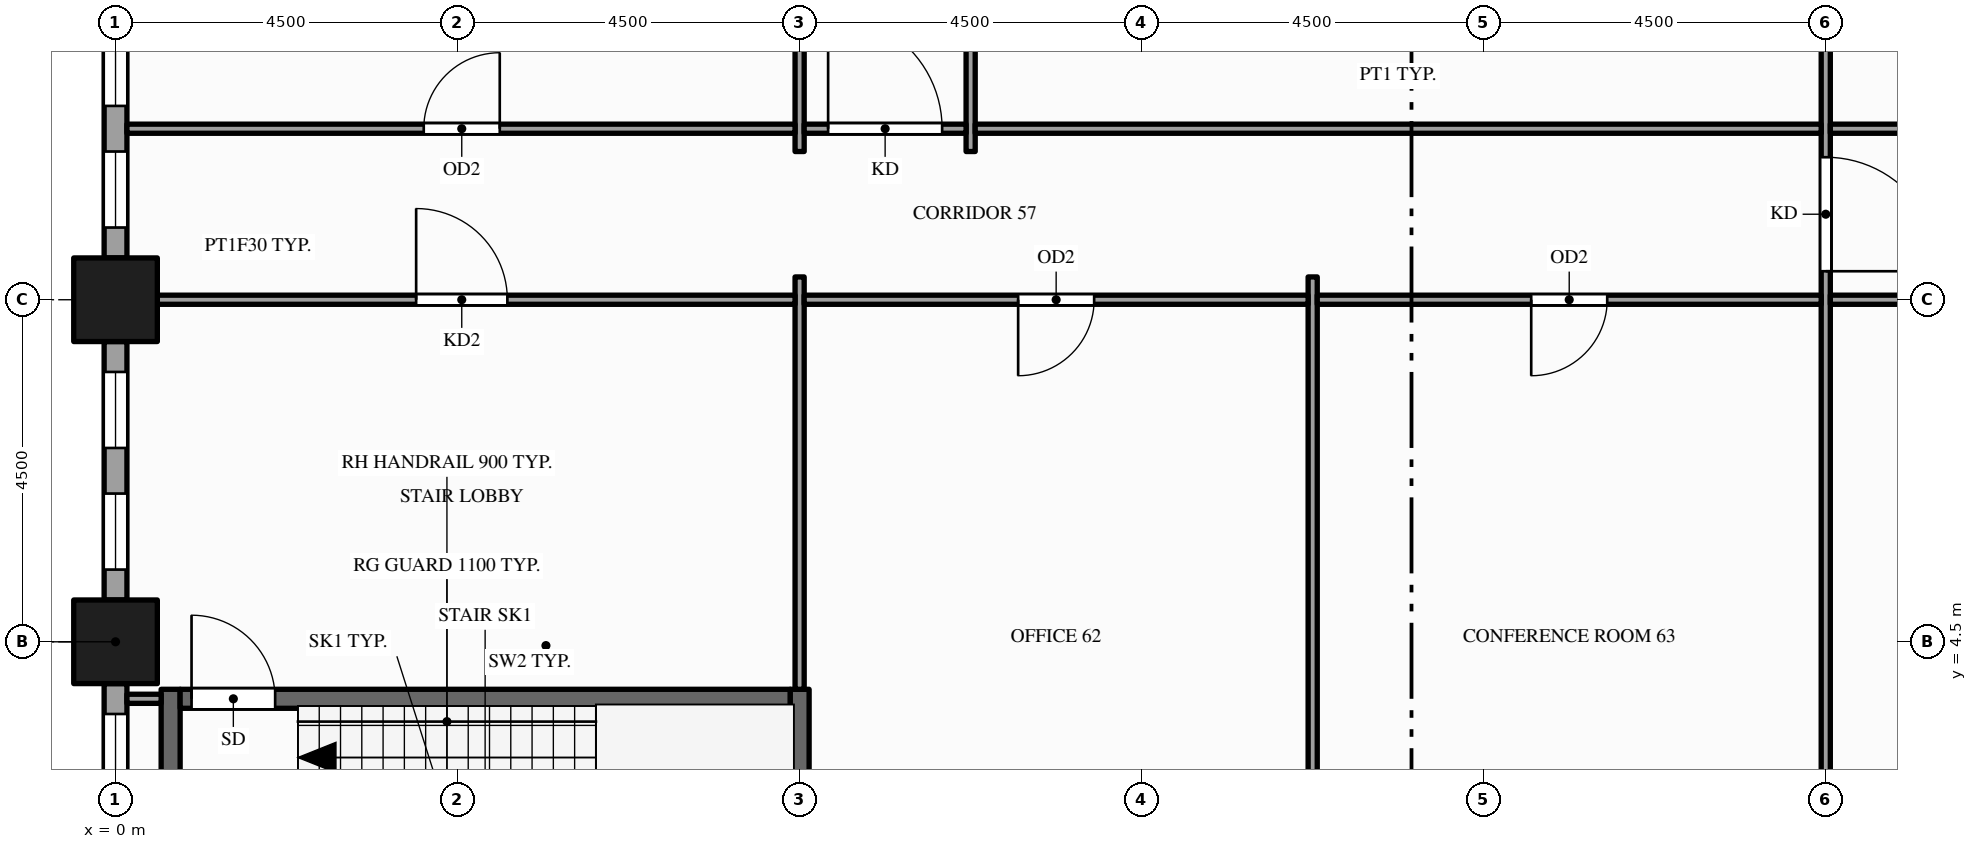
"""IFC4 building model, lengths in metres.
Left out: names, types, materials, properties, quantities, classifications, styles, units other than length and angle.
Written with IfcOpenShell. Run it as: python <this file> out.ifc"""

import sys

from ifc_helpers import new_model, si_unit, direction, frame, frame_2d, origin, origin_2d, place, context, subcontext, project, spatial, rectangle, hollow_rectangle, extrude, element, fill, save


model = new_model("IFC4")
c1 = context("Model", 3, precision=1e-05, world=origin(), true_north=direction((0.0, 1.0)))
c2 = subcontext(c1, "Body", "Model", "MODEL_VIEW")
j1 = project(units=[si_unit("LENGTHUNIT", "METRE"), si_unit("PLANEANGLEUNIT", "RADIAN")], contexts=[c1])
p1 = place(None, origin())
s1 = spatial("IfcSite", under=j1, at=p1, CompositionType="ELEMENT")
p2 = place(p1, origin())
s2 = spatial("IfcBuilding", under=s1, at=p2, CompositionType="ELEMENT")
p3 = place(p2, frame((0.0, 0.0, 19.0)))
s3 = spatial("IfcBuildingStorey", under=s2, at=p3, CompositionType="ELEMENT", Elevation=19.0)
for number, where, z_axis, x_axis in (
    (1, (0.0, 4.5, -0.25), (0.0, 0.0, 1.0), (1.0, 0.0, 0.0)),
    (2, (0.0, 9.0, -0.25), (0.0, 0.0, 1.0), (1.0, 0.0, 0.0)),
):
    element("IfcColumn", number, at=place(p3, frame(where, z_axis=z_axis, x_axis=x_axis)), inside=s3, PredefinedType="COLUMN", context=c2, shape_type="SweptSolid", body=[
        extrude(hollow_rectangle(XDim=1.1, YDim=1.1, WallThickness=0.06, at=origin_2d()), origin(), (0.0, 0.0, 1.0), 5.0),
    ])
p4 = place(p3, frame((0.0, 12.95, 0.0), z_axis=(0.0, 0.0, 1.0), x_axis=(0.0, -1.0, 0.0)))
e3 = element("IfcWall", 3, at=p4, inside=s3, PredefinedType="STANDARD", context=c2, shape_type="SweptSolid", body=[
    extrude(rectangle(XDim=3.4, YDim=0.3, at=frame_2d((1.7, 0.0))), origin(), (0.0, 0.0, 1.0), 4.036),
])
p5 = place(p4, frame((0.4, 0.0, 0.9)))
e4 = element("IfcOpeningElement", 4, at=p5, cuts=e3, PredefinedType="OPENING", context=c2, shape_type="SweptSolid", body=[
    extrude(rectangle(XDim=1.0, YDim=2.75, at=frame_2d((0.5, 1.375))), frame((0.0, 0.16, 0.0), z_axis=(0.0, -1.0, 0.0), x_axis=(1.0, 0.0, 0.0)), (0.0, 0.0, 1.0), 0.32),
])
p6 = place(p4, frame((2.0, 0.0, 0.9)))
e5 = element("IfcOpeningElement", 5, at=p6, cuts=e3, PredefinedType="OPENING", context=c2, shape_type="SweptSolid", body=[
    extrude(rectangle(XDim=1.0, YDim=2.75, at=frame_2d((0.5, 1.375))), frame((0.0, 0.16, 0.0), z_axis=(0.0, -1.0, 0.0), x_axis=(1.0, 0.0, 0.0)), (0.0, 0.0, 1.0), 0.32),
])
p7 = place(p3, frame((0.0, 8.45, 0.0), z_axis=(0.0, 0.0, 1.0), x_axis=(0.0, -1.0, 0.0)))
e6 = element("IfcWall", 6, at=p7, inside=s3, PredefinedType="STANDARD", context=c2, shape_type="SweptSolid", body=[
    extrude(rectangle(XDim=3.4, YDim=0.3, at=frame_2d((1.7, 0.0))), origin(), (0.0, 0.0, 1.0), 4.036),
])
p8 = place(p7, frame((0.4, 0.0, 0.9)))
e7 = element("IfcOpeningElement", 7, at=p8, cuts=e6, PredefinedType="OPENING", context=c2, shape_type="SweptSolid", body=[
    extrude(rectangle(XDim=1.0, YDim=2.75, at=frame_2d((0.5, 1.375))), frame((0.0, 0.16, 0.0), z_axis=(0.0, -1.0, 0.0), x_axis=(1.0, 0.0, 0.0)), (0.0, 0.0, 1.0), 0.32),
])
p9 = place(p7, frame((2.0, 0.0, 0.9)))
e8 = element("IfcOpeningElement", 8, at=p9, cuts=e6, PredefinedType="OPENING", context=c2, shape_type="SweptSolid", body=[
    extrude(rectangle(XDim=1.0, YDim=2.75, at=frame_2d((0.5, 1.375))), frame((0.0, 0.16, 0.0), z_axis=(0.0, -1.0, 0.0), x_axis=(1.0, 0.0, 0.0)), (0.0, 0.0, 1.0), 0.32),
])
p10 = place(p3, frame((0.0, 3.95, 0.0), z_axis=(0.0, 0.0, 1.0), x_axis=(0.0, -1.0, 0.0)))
e9 = element("IfcWall", 9, at=p10, inside=s3, PredefinedType="STANDARD", context=c2, shape_type="SweptSolid", body=[
    extrude(rectangle(XDim=3.4, YDim=0.3, at=frame_2d((1.7, 0.0))), origin(), (0.0, 0.0, 1.0), 4.036),
])
p11 = place(p10, frame((0.4, 0.0, 0.9)))
e10 = element("IfcOpeningElement", 10, at=p11, cuts=e9, PredefinedType="OPENING", context=c2, shape_type="SweptSolid", body=[
    extrude(rectangle(XDim=1.0, YDim=2.75, at=frame_2d((0.5, 1.375))), frame((0.0, 0.16, 0.0), z_axis=(0.0, -1.0, 0.0), x_axis=(1.0, 0.0, 0.0)), (0.0, 0.0, 1.0), 0.32),
])
p12 = place(p10, frame((2.0, 0.0, 0.9)))
e11 = element("IfcOpeningElement", 11, at=p12, cuts=e9, PredefinedType="OPENING", context=c2, shape_type="SweptSolid", body=[
    extrude(rectangle(XDim=1.0, YDim=2.75, at=frame_2d((0.5, 1.375))), frame((0.0, 0.16, 0.0), z_axis=(0.0, -1.0, 0.0), x_axis=(1.0, 0.0, 0.0)), (0.0, 0.0, 1.0), 0.32),
])
p13 = place(p3, frame((0.725, 0.6, 0.0), z_axis=(0.0, 0.0, 1.0), x_axis=(0.0, 1.0, 0.0)))
e12 = element("IfcWall", 12, at=p13, inside=s3, PredefinedType="SHEAR", context=c2, shape_type="SweptSolid", body=[
    extrude(rectangle(XDim=3.275, YDim=0.25, at=frame_2d((1.637, 0.0))), origin(), (0.0, 0.0, 1.0), 4.75),
])
p14 = place(p3, frame((9.0, 0.55, 0.0), z_axis=(0.0, 0.0, 1.0), x_axis=(0.0, 1.0, 0.0)))
e13 = element("IfcWall", 13, at=p14, inside=s3, PredefinedType="SHEAR", context=c2, shape_type="SweptSolid", body=[
    extrude(rectangle(XDim=3.325, YDim=0.25, at=frame_2d((1.663, 0.0))), origin(), (0.0, 0.0, 1.0), 4.75),
])
p15 = place(p3, frame((9.0, 3.875, 0.0), z_axis=(0.0, 0.0, 1.0), x_axis=(0.0, 1.0, 0.0)))
e14 = element("IfcWall", 14, at=p15, inside=s3, PredefinedType="PARTITIONING", context=c2, shape_type="SweptSolid", body=[
    extrude(rectangle(XDim=5.425, YDim=0.12, at=frame_2d((2.712, 0.0))), origin(), (0.0, 0.0, 1.0), 3.759),
])
p16 = place(p3, frame((9.0, 10.95, 0.0), z_axis=(0.0, 0.0, 1.0), x_axis=(0.0, 1.0, 0.0)))
e15 = element("IfcWall", 15, at=p16, inside=s3, PredefinedType="PARTITIONING", context=c2, shape_type="SweptSolid", body=[
    extrude(rectangle(XDim=20.85, YDim=0.12, at=frame_2d((10.425, 0.0))), origin(), (0.0, 0.0, 1.0), 3.5),
])
p17 = place(p16, frame((15.55, 0.0, 0.0)))
e16 = element("IfcOpeningElement", 16, at=p17, cuts=e15, PredefinedType="OPENING", context=c2, shape_type="SweptSolid", body=[
    extrude(rectangle(XDim=1.0, YDim=2.1, at=frame_2d((0.5, 1.05))), frame((0.0, 0.07, 0.0), z_axis=(0.0, -1.0, 0.0), x_axis=(1.0, 0.0, 0.0)), (0.0, 0.0, 1.0), 0.14),
])
p18 = place(p3, frame((11.25, 10.95, 0.0), z_axis=(0.0, 0.0, 1.0), x_axis=(0.0, 1.0, 0.0)))
e17 = element("IfcWall", 17, at=p18, inside=s3, PredefinedType="PARTITIONING", context=c2, shape_type="SweptSolid", body=[
    extrude(rectangle(XDim=20.85, YDim=0.12, at=frame_2d((10.425, 0.0))), origin(), (0.0, 0.0, 1.0), 3.5),
])
p19 = place(p18, frame((5.425, 0.0, 0.0)))
e18 = element("IfcOpeningElement", 18, at=p19, cuts=e17, PredefinedType="OPENING", context=c2, shape_type="SweptSolid", body=[
    extrude(rectangle(XDim=1.0, YDim=2.1, at=frame_2d((0.5, 1.05))), frame((0.0, 0.07, 0.0), z_axis=(0.0, -1.0, 0.0), x_axis=(1.0, 0.0, 0.0)), (0.0, 0.0, 1.0), 0.14),
])
p20 = place(p18, frame((12.175, 0.0, 0.0)))
e19 = element("IfcOpeningElement", 19, at=p20, cuts=e17, PredefinedType="OPENING", context=c2, shape_type="SweptSolid", body=[
    extrude(rectangle(XDim=1.0, YDim=2.1, at=frame_2d((0.5, 1.05))), frame((0.0, 0.07, 0.0), z_axis=(0.0, -1.0, 0.0), x_axis=(1.0, 0.0, 0.0)), (0.0, 0.0, 1.0), 0.14),
])
p21 = place(p18, frame((16.675, 0.0, 0.0)))
e20 = element("IfcOpeningElement", 20, at=p21, cuts=e17, PredefinedType="OPENING", context=c2, shape_type="SweptSolid", body=[
    extrude(rectangle(XDim=1.0, YDim=2.1, at=frame_2d((0.5, 1.05))), frame((0.0, 0.07, 0.0), z_axis=(0.0, -1.0, 0.0), x_axis=(1.0, 0.0, 0.0)), (0.0, 0.0, 1.0), 0.14),
])
p22 = place(p3, frame((15.75, 0.15, 0.0), z_axis=(0.0, 0.0, 1.0), x_axis=(0.0, 1.0, 0.0)))
e21 = element("IfcWall", 21, at=p22, inside=s3, PredefinedType="PARTITIONING", context=c2, shape_type="SweptSolid", body=[
    extrude(rectangle(XDim=9.15, YDim=0.12, at=frame_2d((4.575, 0.0))), origin(), (0.0, 0.0, 1.0), 3.759),
])
p23 = place(p3, frame((22.5, 0.15, 0.0), z_axis=(0.0, 0.0, 1.0), x_axis=(0.0, 1.0, 0.0)))
e22 = element("IfcWall", 22, at=p23, inside=s3, PredefinedType="PARTITIONING", context=c2, shape_type="SweptSolid", body=[
    extrude(rectangle(XDim=35.95, YDim=0.12, at=frame_2d((17.975, 0.0))), origin(), (0.0, 0.0, 1.0), 3.759),
])
p24 = place(p23, frame((9.225, 0.0, 0.0)))
e23 = element("IfcOpeningElement", 23, at=p24, cuts=e22, PredefinedType="OPENING", context=c2, shape_type="SweptSolid", body=[
    extrude(rectangle(XDim=1.5, YDim=2.1, at=frame_2d((0.75, 1.05))), frame((0.0, 0.07, 0.0), z_axis=(0.0, -1.0, 0.0), x_axis=(1.0, 0.0, 0.0)), (0.0, 0.0, 1.0), 0.14),
])
p25 = place(p23, frame((32.7, 0.0, 0.0)))
e24 = element("IfcOpeningElement", 24, at=p25, cuts=e22, PredefinedType="OPENING", context=c2, shape_type="SweptSolid", body=[
    extrude(rectangle(XDim=1.8, YDim=2.1, at=frame_2d((0.9, 1.05))), frame((0.0, 0.07, 0.0), z_axis=(0.0, -1.0, 0.0), x_axis=(1.0, 0.0, 0.0)), (0.0, 0.0, 1.0), 0.14),
])
p26 = place(p3, frame((0.15, 3.75, 0.0), z_axis=(0.0, 0.0, 1.0), x_axis=(1.0, 0.0, 0.0)))
e25 = element("IfcWall", 25, at=p26, inside=s3, PredefinedType="PARTITIONING", context=c2, shape_type="SweptSolid", body=[
    extrude(rectangle(XDim=0.45, YDim=0.12, at=frame_2d((0.225, 0.0))), origin(), (0.0, 0.0, 1.0), 4.036),
])
p27 = place(p3, frame((0.85, 3.75, 0.0), z_axis=(0.0, 0.0, 1.0), x_axis=(1.0, 0.0, 0.0)))
e26 = element("IfcWall", 26, at=p27, inside=s3, PredefinedType="SHEAR", context=c2, shape_type="SweptSolid", body=[
    extrude(rectangle(XDim=8.025, YDim=0.25, at=frame_2d((4.012, 0.0))), origin(), (0.0, 0.0, 1.0), 4.75),
])
p28 = place(p27, frame((0.15, 0.0, 0.0)))
e27 = element("IfcOpeningElement", 27, at=p28, cuts=e26, PredefinedType="OPENING", context=c2, shape_type="SweptSolid", body=[
    extrude(rectangle(XDim=1.1, YDim=2.1, at=frame_2d((0.55, 1.05))), frame((0.0, 0.135, 0.0), z_axis=(0.0, -1.0, 0.0), x_axis=(1.0, 0.0, 0.0)), (0.0, 0.0, 1.0), 0.27),
])
p29 = place(p3, frame((0.15, 9.0, 0.0), z_axis=(0.0, 0.0, 1.0), x_axis=(1.0, 0.0, 0.0)))
e28 = element("IfcWall", 28, at=p29, inside=s3, PredefinedType="PARTITIONING", context=c2, shape_type="SweptSolid", body=[
    extrude(rectangle(XDim=8.79, YDim=0.12, at=frame_2d((4.395, 0.0))), origin(), (0.0, 0.0, 1.0), 3.759),
])
p30 = place(p29, frame((3.805, 0.0, 0.0)))
e29 = element("IfcOpeningElement", 29, at=p30, cuts=e28, PredefinedType="OPENING", context=c2, shape_type="SweptSolid", body=[
    extrude(rectangle(XDim=1.2, YDim=2.1, at=frame_2d((0.6, 1.05))), frame((0.0, 0.07, 0.0), z_axis=(0.0, -1.0, 0.0), x_axis=(1.0, 0.0, 0.0)), (0.0, 0.0, 1.0), 0.14),
])
p31 = place(p3, frame((9.06, 9.0, 0.0), z_axis=(0.0, 0.0, 1.0), x_axis=(1.0, 0.0, 0.0)))
e30 = element("IfcWall", 30, at=p31, inside=s3, PredefinedType="PARTITIONING", context=c2, shape_type="SweptSolid", body=[
    extrude(rectangle(XDim=6.63, YDim=0.12, at=frame_2d((3.315, 0.0))), origin(), (0.0, 0.0, 1.0), 3.759),
])
p32 = place(p31, frame((2.815, 0.0, 0.0)))
e31 = element("IfcOpeningElement", 31, at=p32, cuts=e30, PredefinedType="OPENING", context=c2, shape_type="SweptSolid", body=[
    extrude(rectangle(XDim=1.0, YDim=2.1, at=frame_2d((0.5, 1.05))), frame((0.0, 0.07, 0.0), z_axis=(0.0, -1.0, 0.0), x_axis=(1.0, 0.0, 0.0)), (0.0, 0.0, 1.0), 0.14),
])
p33 = place(p3, frame((15.81, 9.0, 0.0), z_axis=(0.0, 0.0, 1.0), x_axis=(1.0, 0.0, 0.0)))
e32 = element("IfcWall", 32, at=p33, inside=s3, PredefinedType="PARTITIONING", context=c2, shape_type="SweptSolid", body=[
    extrude(rectangle(XDim=6.63, YDim=0.12, at=frame_2d((3.315, 0.0))), origin(), (0.0, 0.0, 1.0), 3.759),
])
p34 = place(p33, frame((2.815, 0.0, 0.0)))
e33 = element("IfcOpeningElement", 33, at=p34, cuts=e32, PredefinedType="OPENING", context=c2, shape_type="SweptSolid", body=[
    extrude(rectangle(XDim=1.0, YDim=2.1, at=frame_2d((0.5, 1.05))), frame((0.0, 0.07, 0.0), z_axis=(0.0, -1.0, 0.0), x_axis=(1.0, 0.0, 0.0)), (0.0, 0.0, 1.0), 0.14),
])
p35 = place(p3, frame((22.56, 9.0, 0.0), z_axis=(0.0, 0.0, 1.0), x_axis=(1.0, 0.0, 0.0)))
e34 = element("IfcWall", 34, at=p35, inside=s3, PredefinedType="PARTITIONING", context=c2, shape_type="SweptSolid", body=[
    extrude(rectangle(XDim=13.38, YDim=0.12, at=frame_2d((6.69, 0.0))), origin(), (0.0, 0.0, 1.0), 3.66),
])
p36 = place(p35, frame((6.09, 0.0, 0.0)))
e35 = element("IfcOpeningElement", 35, at=p36, cuts=e34, PredefinedType="OPENING", context=c2, shape_type="SweptSolid", body=[
    extrude(rectangle(XDim=1.2, YDim=2.1, at=frame_2d((0.6, 1.05))), frame((0.0, 0.07, 0.0), z_axis=(0.0, -1.0, 0.0), x_axis=(1.0, 0.0, 0.0)), (0.0, 0.0, 1.0), 0.14),
])
p37 = place(p3, frame((0.15, 11.25, 0.0), z_axis=(0.0, 0.0, 1.0), x_axis=(1.0, 0.0, 0.0)))
e36 = element("IfcWall", 36, at=p37, inside=s3, PredefinedType="PARTITIONING", context=c2, shape_type="SweptSolid", body=[
    extrude(rectangle(XDim=8.79, YDim=0.12, at=frame_2d((4.395, 0.0))), origin(), (0.0, 0.0, 1.0), 3.759),
])
p38 = place(p37, frame((3.905, 0.0, 0.0)))
e37 = element("IfcOpeningElement", 37, at=p38, cuts=e36, PredefinedType="OPENING", context=c2, shape_type="SweptSolid", body=[
    extrude(rectangle(XDim=1.0, YDim=2.1, at=frame_2d((0.5, 1.05))), frame((0.0, 0.07, 0.0), z_axis=(0.0, -1.0, 0.0), x_axis=(1.0, 0.0, 0.0)), (0.0, 0.0, 1.0), 0.14),
])
p39 = place(p3, frame((9.06, 11.25, 0.0), z_axis=(0.0, 0.0, 1.0), x_axis=(1.0, 0.0, 0.0)))
e38 = element("IfcWall", 38, at=p39, inside=s3, PredefinedType="PARTITIONING", context=c2, shape_type="SweptSolid", body=[
    extrude(rectangle(XDim=2.13, YDim=0.12, at=frame_2d((1.065, 0.0))), origin(), (0.0, 0.0, 1.0), 3.759),
])
p40 = place(p39, frame((0.315, 0.0, 0.0)))
e39 = element("IfcOpeningElement", 39, at=p40, cuts=e38, PredefinedType="OPENING", context=c2, shape_type="SweptSolid", body=[
    extrude(rectangle(XDim=1.5, YDim=2.1, at=frame_2d((0.75, 1.05))), frame((0.0, 0.07, 0.0), z_axis=(0.0, -1.0, 0.0), x_axis=(1.0, 0.0, 0.0)), (0.0, 0.0, 1.0), 0.14),
])
p41 = place(p3, frame((11.31, 11.25, 0.0), z_axis=(0.0, 0.0, 1.0), x_axis=(1.0, 0.0, 0.0)))
e40 = element("IfcWall", 40, at=p41, inside=s3, PredefinedType="PARTITIONING", context=c2, shape_type="SweptSolid", body=[
    extrude(rectangle(XDim=11.13, YDim=0.12, at=frame_2d((5.565, 0.0))), origin(), (0.0, 0.0, 1.0), 3.759),
])
p42 = place(p3, frame((22.56, 11.25, 0.0), z_axis=(0.0, 0.0, 1.0), x_axis=(1.0, 0.0, 0.0)))
e41 = element("IfcWall", 41, at=p42, inside=s3, PredefinedType="PARTITIONING", context=c2, shape_type="SweptSolid", body=[
    extrude(rectangle(XDim=13.38, YDim=0.12, at=frame_2d((6.69, 0.0))), origin(), (0.0, 0.0, 1.0), 3.66),
])
p43 = place(p42, frame((6.09, 0.0, 0.0)))
e42 = element("IfcOpeningElement", 42, at=p43, cuts=e41, PredefinedType="OPENING", context=c2, shape_type="SweptSolid", body=[
    extrude(rectangle(XDim=1.2, YDim=2.1, at=frame_2d((0.6, 1.05))), frame((0.0, 0.07, 0.0), z_axis=(0.0, -1.0, 0.0), x_axis=(1.0, 0.0, 0.0)), (0.0, 0.0, 1.0), 0.14),
])
p44 = place(p5, origin())
e43 = element("IfcWindow", 43, at=p44, inside=s3, PartitioningType="SINGLE_PANEL", PredefinedType="WINDOW", context=c2, shape_type="SweptSolid", body=[
    extrude(rectangle(XDim=1.0, YDim=2.75, at=frame_2d((0.5, 1.375))), frame((0.0, 0.03, 0.0), z_axis=(0.0, -1.0, 0.0), x_axis=(1.0, 0.0, 0.0)), (0.0, 0.0, 1.0), 0.06),
])
fill(e4, e43)
p45 = place(p6, origin())
e44 = element("IfcWindow", 44, at=p45, inside=s3, PartitioningType="SINGLE_PANEL", PredefinedType="WINDOW", context=c2, shape_type="SweptSolid", body=[
    extrude(rectangle(XDim=1.0, YDim=2.75, at=frame_2d((0.5, 1.375))), frame((0.0, 0.03, 0.0), z_axis=(0.0, -1.0, 0.0), x_axis=(1.0, 0.0, 0.0)), (0.0, 0.0, 1.0), 0.06),
])
fill(e5, e44)
p46 = place(p8, origin())
e45 = element("IfcWindow", 45, at=p46, inside=s3, PartitioningType="SINGLE_PANEL", PredefinedType="WINDOW", context=c2, shape_type="SweptSolid", body=[
    extrude(rectangle(XDim=1.0, YDim=2.75, at=frame_2d((0.5, 1.375))), frame((0.0, 0.03, 0.0), z_axis=(0.0, -1.0, 0.0), x_axis=(1.0, 0.0, 0.0)), (0.0, 0.0, 1.0), 0.06),
])
fill(e7, e45)
p47 = place(p9, origin())
e46 = element("IfcWindow", 46, at=p47, inside=s3, PartitioningType="SINGLE_PANEL", PredefinedType="WINDOW", context=c2, shape_type="SweptSolid", body=[
    extrude(rectangle(XDim=1.0, YDim=2.75, at=frame_2d((0.5, 1.375))), frame((0.0, 0.03, 0.0), z_axis=(0.0, -1.0, 0.0), x_axis=(1.0, 0.0, 0.0)), (0.0, 0.0, 1.0), 0.06),
])
fill(e8, e46)
p48 = place(p11, origin())
e47 = element("IfcWindow", 47, at=p48, inside=s3, PartitioningType="SINGLE_PANEL", PredefinedType="WINDOW", context=c2, shape_type="SweptSolid", body=[
    extrude(rectangle(XDim=1.0, YDim=2.75, at=frame_2d((0.5, 1.375))), frame((0.0, 0.03, 0.0), z_axis=(0.0, -1.0, 0.0), x_axis=(1.0, 0.0, 0.0)), (0.0, 0.0, 1.0), 0.06),
])
fill(e10, e47)
p49 = place(p28, origin())
e48 = element("IfcDoor", 48, at=p49, inside=s3, OperationType="SINGLE_SWING_LEFT", PredefinedType="DOOR", context=c2, shape_type="SweptSolid", body=[
    extrude(rectangle(XDim=1.1, YDim=2.1, at=frame_2d((0.55, 1.05))), frame((0.0, 0.025, 0.0), z_axis=(0.0, -1.0, 0.0), x_axis=(1.0, 0.0, 0.0)), (0.0, 0.0, 1.0), 0.05),
])
fill(e27, e48)
p50 = place(p30, origin())
e49 = element("IfcDoor", 49, at=p50, inside=s3, OperationType="SINGLE_SWING_LEFT", PredefinedType="DOOR", context=c2, shape_type="SweptSolid", body=[
    extrude(rectangle(XDim=1.2, YDim=2.1, at=frame_2d((0.6, 1.05))), frame((0.0, 0.025, 0.0), z_axis=(0.0, -1.0, 0.0), x_axis=(1.0, 0.0, 0.0)), (0.0, 0.0, 1.0), 0.05),
])
fill(e29, e49)
p51 = place(p24, origin())
e50 = element("IfcDoor", 50, at=p51, inside=s3, OperationType="SINGLE_SWING_LEFT", PredefinedType="DOOR", context=c2, shape_type="SweptSolid", body=[
    extrude(rectangle(XDim=1.5, YDim=2.1, at=frame_2d((0.75, 1.05))), frame((0.0, 0.025, 0.0), z_axis=(0.0, -1.0, 0.0), x_axis=(1.0, 0.0, 0.0)), (0.0, 0.0, 1.0), 0.05),
])
fill(e23, e50)
p52 = place(p32, origin())
e51 = element("IfcDoor", 51, at=p52, inside=s3, OperationType="SINGLE_SWING_LEFT", PredefinedType="DOOR", context=c2, shape_type="SweptSolid", body=[
    extrude(rectangle(XDim=1.0, YDim=2.1, at=frame_2d((0.5, 1.05))), frame((0.0, 0.025, 0.0), z_axis=(0.0, -1.0, 0.0), x_axis=(1.0, 0.0, 0.0)), (0.0, 0.0, 1.0), 0.05),
])
fill(e31, e51)
p53 = place(p34, origin())
e52 = element("IfcDoor", 52, at=p53, inside=s3, OperationType="SINGLE_SWING_LEFT", PredefinedType="DOOR", context=c2, shape_type="SweptSolid", body=[
    extrude(rectangle(XDim=1.0, YDim=2.1, at=frame_2d((0.5, 1.05))), frame((0.0, 0.025, 0.0), z_axis=(0.0, -1.0, 0.0), x_axis=(1.0, 0.0, 0.0)), (0.0, 0.0, 1.0), 0.05),
])
fill(e33, e52)
p54 = place(p40, origin())
e53 = element("IfcDoor", 53, at=p54, inside=s3, OperationType="SINGLE_SWING_LEFT", PredefinedType="DOOR", context=c2, shape_type="SweptSolid", body=[
    extrude(rectangle(XDim=1.5, YDim=2.1, at=frame_2d((0.75, 1.05))), frame((0.0, 0.025, 0.0), z_axis=(0.0, -1.0, 0.0), x_axis=(1.0, 0.0, 0.0)), (0.0, 0.0, 1.0), 0.05),
])
fill(e39, e53)
p55 = place(p38, origin())
e54 = element("IfcDoor", 54, at=p55, inside=s3, OperationType="SINGLE_SWING_RIGHT", PredefinedType="DOOR", context=c2, shape_type="SweptSolid", body=[
    extrude(rectangle(XDim=1.0, YDim=2.1, at=frame_2d((0.5, 1.05))), frame((0.0, 0.025, 0.0), z_axis=(0.0, -1.0, 0.0), x_axis=(1.0, 0.0, 0.0)), (0.0, 0.0, 1.0), 0.05),
])
fill(e37, e54)
save(model, sys.argv[1])
